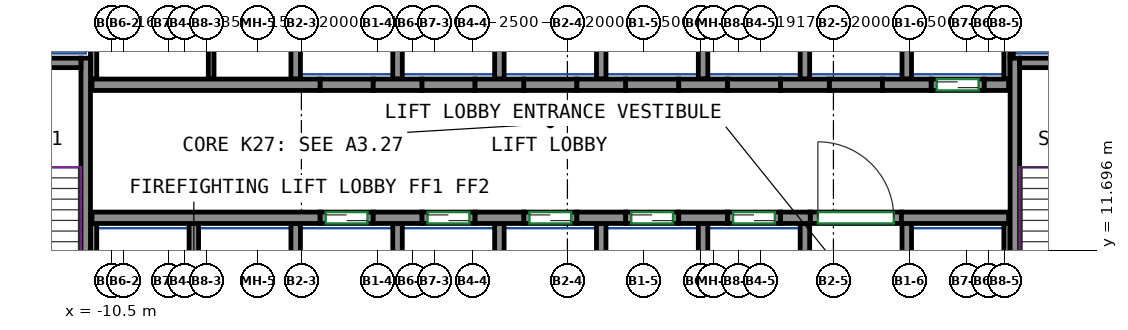
"""IFC4 building model, lengths in metres.
Left out: names, types, materials, properties, quantities, classifications, styles, units other than length and angle.
Written with IfcOpenShell. Run it as: python <this file> out.ifc"""

import sys

from ifc_helpers import new_model, si_unit, direction, frame, frame_2d, origin, place, context, subcontext, project, spatial, rectangle, extrude, source, transform, mapped, element, fill, save


model = new_model("IFC4")
c1 = context("Model", 3, precision=1e-05, world=origin(), true_north=direction((0.0, 1.0)))
c2 = subcontext(c1, "Body", "Model", "MODEL_VIEW")
j1 = project(units=[si_unit("LENGTHUNIT", "METRE"), si_unit("PLANEANGLEUNIT", "RADIAN")], contexts=[c1])
p1 = place(None, origin())
s1 = spatial("IfcSite", under=j1, at=p1, CompositionType="ELEMENT")
p2 = place(p1, origin())
s2 = spatial("IfcBuilding", under=s1, at=p2, CompositionType="ELEMENT")
p3 = place(p2, frame((0.0, 0.0, 112.6)))
s3 = spatial("IfcBuildingStorey", under=s2, at=p3, CompositionType="ELEMENT", Elevation=112.6)
m1 = source(origin(), c2, "Body", "SweptSolid", [
    extrude(rectangle(XDim=7.75, YDim=0.25, at=frame_2d((3.875, 0.0))), origin(), (0.0, 0.0, 1.0), 3.72),
])
p4 = place(p3, frame((-11.175, 9.0, 0.0), z_axis=(0.0, 0.0, 1.0), x_axis=(0.0, 1.0, 0.0)))
e1 = element("IfcWall", 1, at=p4, inside=s3, PredefinedType="SHEAR", context=c2, shape_type="MappedRepresentation", body=[
    mapped(m1, transform((0.0, 0.0, 0.0))),
])
m2 = source(origin(), c2, "Body", "SweptSolid", [
    extrude(rectangle(XDim=3.7, YDim=0.25, at=frame_2d((1.85, 0.0))), origin(), (0.0, 0.0, 1.0), 3.72),
])
p5 = place(p3, frame((-15.0, 16.625, 0.0), z_axis=(0.0, 0.0, 1.0), x_axis=(1.0, 0.0, 0.0)))
e2 = element("IfcWall", 2, at=p5, inside=s3, PredefinedType="SHEAR", context=c2, shape_type="MappedRepresentation", body=[
    mapped(m2, transform((0.0, 0.0, 0.0))),
])
p6 = place(p3, frame((13.275, 9.0, 0.0), z_axis=(0.0, 0.0, 1.0), x_axis=(0.0, 1.0, 0.0)))
e3 = element("IfcWall", 3, at=p6, inside=s3, PredefinedType="SHEAR", context=c2, shape_type="MappedRepresentation", body=[
    mapped(m1, transform((0.0, 0.0, 0.0))),
])
m3 = source(origin(), c2, "Body", "SweptSolid", [
    extrude(rectangle(XDim=3.7, YDim=0.25, at=frame_2d((1.85, 0.0))), origin(), (0.0, 0.0, 1.0), 3.72),
])
p7 = place(p3, frame((13.4, 16.625, 0.0), z_axis=(0.0, 0.0, 1.0), x_axis=(1.0, 0.0, 0.0)))
e4 = element("IfcWall", 4, at=p7, inside=s3, PredefinedType="SHEAR", context=c2, shape_type="MappedRepresentation", body=[
    mapped(m3, transform((0.0, 0.0, 0.0))),
])
m4 = source(origin(), c2, "Body", "SweptSolid", [
    extrude(rectangle(XDim=6.0, YDim=0.3, at=frame_2d((3.0, 0.0))), origin(), (0.0, 0.0, 1.0), 3.72),
])
p8 = place(p3, frame((-11.01, 12.55, 0.0), z_axis=(0.0, 0.0, 1.0), x_axis=(1.0, 0.0, 0.0)))
e5 = element("IfcWall", 5, at=p8, inside=s3, PredefinedType="SHEAR", context=c2, shape_type="MappedRepresentation", body=[
    mapped(m4, transform((0.0, 0.0, 0.0))),
])
m5 = source(origin(), c2, "Body", "SweptSolid", [
    extrude(rectangle(XDim=1.28, YDim=0.3, at=frame_2d((0.64, 0.0))), origin(), (0.0, 0.0, 1.0), 3.72),
])
for number, where, z_axis, x_axis in (
    (6, (-3.61, 12.55, 0.0), (0.0, 0.0, 1.0), (1.0, 0.0, 0.0)),
    (7, (-0.93, 12.55, 0.0), (0.0, 0.0, 1.0), (1.0, 0.0, 0.0)),
    (8, (1.75, 12.55, 0.0), (0.0, 0.0, 1.0), (1.0, 0.0, 0.0)),
    (9, (4.43, 12.55, 0.0), (0.0, 0.0, 1.0), (1.0, 0.0, 0.0)),
):
    element("IfcWall", number, at=place(p3, frame(where, z_axis=z_axis, x_axis=x_axis)), inside=s3, PredefinedType="SHEAR", context=c2, shape_type="MappedRepresentation", body=[
        mapped(m5, transform((0.0, 0.0, 0.0))),
    ])
m6 = source(origin(), c2, "Body", "SweptSolid", [
    extrude(rectangle(XDim=0.78, YDim=0.3, at=frame_2d((0.39, 0.0))), origin(), (0.0, 0.0, 1.0), 3.72),
])
p9 = place(p3, frame((7.11, 12.55, 0.0), z_axis=(0.0, 0.0, 1.0), x_axis=(1.0, 0.0, 0.0)))
e10 = element("IfcWall", 10, at=p9, inside=s3, PredefinedType="SHEAR", context=c2, shape_type="MappedRepresentation", body=[
    mapped(m6, transform((0.0, 0.0, 0.0))),
])
m7 = source(origin(), c2, "Body", "SweptSolid", [
    extrude(rectangle(XDim=2.82, YDim=0.3, at=frame_2d((1.41, 0.0))), origin(), (0.0, 0.0, 1.0), 3.72),
])
p10 = place(p3, frame((10.29, 12.55, 0.0), z_axis=(0.0, 0.0, 1.0), x_axis=(1.0, 0.0, 0.0)))
e11 = element("IfcWall", 11, at=p10, inside=s3, PredefinedType="SHEAR", context=c2, shape_type="MappedRepresentation", body=[
    mapped(m7, transform((0.0, 0.0, 0.0))),
])
p11 = place(p3, frame((-11.01, 16.05, 0.0), z_axis=(0.0, 0.0, 1.0), x_axis=(1.0, 0.0, 0.0)))
e12 = element("IfcWall", 12, at=p11, inside=s3, PredefinedType="SHEAR", context=c2, shape_type="MappedRepresentation", body=[
    mapped(m4, transform((0.0, 0.0, 0.0))),
])
for number, where, z_axis, x_axis in (
    (13, (-3.61, 16.05, 0.0), (0.0, 0.0, 1.0), (1.0, 0.0, 0.0)),
    (14, (-0.93, 16.05, 0.0), (0.0, 0.0, 1.0), (1.0, 0.0, 0.0)),
    (15, (1.75, 16.05, 0.0), (0.0, 0.0, 1.0), (1.0, 0.0, 0.0)),
    (16, (4.43, 16.05, 0.0), (0.0, 0.0, 1.0), (1.0, 0.0, 0.0)),
):
    element("IfcWall", number, at=place(p3, frame(where, z_axis=z_axis, x_axis=x_axis)), inside=s3, PredefinedType="SHEAR", context=c2, shape_type="MappedRepresentation", body=[
        mapped(m5, transform((0.0, 0.0, 0.0))),
    ])
m8 = source(origin(), c2, "Body", "SweptSolid", [
    extrude(rectangle(XDim=1.28, YDim=0.3, at=frame_2d((0.64, 0.0))), origin(), (0.0, 0.0, 1.0), 3.72),
])
p12 = place(p3, frame((7.11, 16.05, 0.0), z_axis=(0.0, 0.0, 1.0), x_axis=(1.0, 0.0, 0.0)))
e17 = element("IfcWall", 17, at=p12, inside=s3, PredefinedType="SHEAR", context=c2, shape_type="MappedRepresentation", body=[
    mapped(m8, transform((0.0, 0.0, 0.0))),
])
p13 = place(p3, frame((9.79, 16.05, 0.0), z_axis=(0.0, 0.0, 1.0), x_axis=(1.0, 0.0, 0.0)))
e18 = element("IfcWall", 18, at=p13, inside=s3, PredefinedType="SHEAR", context=c2, shape_type="MappedRepresentation", body=[
    mapped(m5, transform((0.0, 0.0, 0.0))),
])
m9 = source(origin(), c2, "Body", "SweptSolid", [
    extrude(rectangle(XDim=0.64, YDim=0.3, at=frame_2d((0.32, 0.0))), origin(), (0.0, 0.0, 1.0), 3.72),
])
p14 = place(p3, frame((12.47, 16.05, 0.0), z_axis=(0.0, 0.0, 1.0), x_axis=(1.0, 0.0, 0.0)))
e19 = element("IfcWall", 19, at=p14, inside=s3, PredefinedType="SHEAR", context=c2, shape_type="MappedRepresentation", body=[
    mapped(m9, transform((0.0, 0.0, 0.0))),
])
m10 = source(origin(), c2, "Body", "SweptSolid", [
    extrude(rectangle(XDim=1.4, YDim=0.3, at=frame_2d((0.7, 0.0))), origin(), (0.0, 0.0, 1.0), 3.72),
])
p15 = place(p3, frame((-5.01, 12.55, 0.0), z_axis=(0.0, 0.0, 1.0), x_axis=(1.0, 0.0, 0.0)))
e20 = element("IfcWall", 20, at=p15, inside=s3, PredefinedType="PARTITIONING", context=c2, shape_type="MappedRepresentation", body=[
    mapped(m10, transform((0.0, 0.0, 0.0))),
])
p16 = place(p15, frame((0.15, 0.0, 0.0)))
e21 = element("IfcOpeningElement", 21, at=p16, cuts=e20, PredefinedType="OPENING", context=c2, shape_type="SweptSolid", body=[
    extrude(rectangle(XDim=1.1, YDim=2.1, at=frame_2d((0.55, 1.05))), frame((0.0, 0.16, 0.0), z_axis=(0.0, -1.0, 0.0), x_axis=(1.0, 0.0, 0.0)), (0.0, 0.0, 1.0), 0.32),
])
m11 = source(origin(), c2, "Body", "SweptSolid", [
    extrude(rectangle(XDim=1.4, YDim=0.3, at=frame_2d((0.7, 0.0))), origin(), (0.0, 0.0, 1.0), 3.72),
])
p17 = place(p3, frame((-2.33, 12.55, 0.0), z_axis=(0.0, 0.0, 1.0), x_axis=(1.0, 0.0, 0.0)))
e22 = element("IfcWall", 22, at=p17, inside=s3, PredefinedType="PARTITIONING", context=c2, shape_type="MappedRepresentation", body=[
    mapped(m11, transform((0.0, 0.0, 0.0))),
])
p18 = place(p17, frame((0.15, 0.0, 0.0)))
e23 = element("IfcOpeningElement", 23, at=p18, cuts=e22, PredefinedType="OPENING", context=c2, shape_type="SweptSolid", body=[
    extrude(rectangle(XDim=1.1, YDim=2.1, at=frame_2d((0.55, 1.05))), frame((0.0, 0.16, 0.0), z_axis=(0.0, -1.0, 0.0), x_axis=(1.0, 0.0, 0.0)), (0.0, 0.0, 1.0), 0.32),
])
p19 = place(p3, frame((0.35, 12.55, 0.0), z_axis=(0.0, 0.0, 1.0), x_axis=(1.0, 0.0, 0.0)))
e24 = element("IfcWall", 24, at=p19, inside=s3, PredefinedType="PARTITIONING", context=c2, shape_type="MappedRepresentation", body=[
    mapped(m10, transform((0.0, 0.0, 0.0))),
])
p20 = place(p19, frame((0.15, 0.0, 0.0)))
e25 = element("IfcOpeningElement", 25, at=p20, cuts=e24, PredefinedType="OPENING", context=c2, shape_type="SweptSolid", body=[
    extrude(rectangle(XDim=1.1, YDim=2.1, at=frame_2d((0.55, 1.05))), frame((0.0, 0.16, 0.0), z_axis=(0.0, -1.0, 0.0), x_axis=(1.0, 0.0, 0.0)), (0.0, 0.0, 1.0), 0.32),
])
p21 = place(p3, frame((3.03, 12.55, 0.0), z_axis=(0.0, 0.0, 1.0), x_axis=(1.0, 0.0, 0.0)))
e26 = element("IfcWall", 26, at=p21, inside=s3, PredefinedType="PARTITIONING", context=c2, shape_type="MappedRepresentation", body=[
    mapped(m10, transform((0.0, 0.0, 0.0))),
])
p22 = place(p21, frame((0.15, 0.0, 0.0)))
e27 = element("IfcOpeningElement", 27, at=p22, cuts=e26, PredefinedType="OPENING", context=c2, shape_type="SweptSolid", body=[
    extrude(rectangle(XDim=1.1, YDim=2.1, at=frame_2d((0.55, 1.05))), frame((0.0, 0.16, 0.0), z_axis=(0.0, -1.0, 0.0), x_axis=(1.0, 0.0, 0.0)), (0.0, 0.0, 1.0), 0.32),
])
p23 = place(p3, frame((5.71, 12.55, 0.0), z_axis=(0.0, 0.0, 1.0), x_axis=(1.0, 0.0, 0.0)))
e28 = element("IfcWall", 28, at=p23, inside=s3, PredefinedType="PARTITIONING", context=c2, shape_type="MappedRepresentation", body=[
    mapped(m11, transform((0.0, 0.0, 0.0))),
])
p24 = place(p23, frame((0.15, 0.0, 0.0)))
e29 = element("IfcOpeningElement", 29, at=p24, cuts=e28, PredefinedType="OPENING", context=c2, shape_type="SweptSolid", body=[
    extrude(rectangle(XDim=1.1, YDim=2.1, at=frame_2d((0.55, 1.05))), frame((0.0, 0.16, 0.0), z_axis=(0.0, -1.0, 0.0), x_axis=(1.0, 0.0, 0.0)), (0.0, 0.0, 1.0), 0.32),
])
p25 = place(p3, frame((11.07, 16.05, 0.0), z_axis=(0.0, 0.0, 1.0), x_axis=(1.0, 0.0, 0.0)))
e30 = element("IfcWall", 30, at=p25, inside=s3, PredefinedType="PARTITIONING", context=c2, shape_type="MappedRepresentation", body=[
    mapped(m10, transform((0.0, 0.0, 0.0))),
])
p26 = place(p25, frame((0.15, 0.0, 0.0)))
e31 = element("IfcOpeningElement", 31, at=p26, cuts=e30, PredefinedType="OPENING", context=c2, shape_type="SweptSolid", body=[
    extrude(rectangle(XDim=1.1, YDim=2.1, at=frame_2d((0.55, 1.05))), frame((0.0, 0.16, 0.0), z_axis=(0.0, -1.0, 0.0), x_axis=(1.0, 0.0, 0.0)), (0.0, 0.0, 1.0), 0.32),
])
m12 = source(origin(), c2, "Body", "SweptSolid", [
    extrude(rectangle(XDim=2.4, YDim=0.3, at=frame_2d((1.2, 0.0))), origin(), (0.0, 0.0, 1.0), 3.72),
])
p27 = place(p3, frame((7.89, 12.55, 0.0), z_axis=(0.0, 0.0, 1.0), x_axis=(1.0, 0.0, 0.0)))
e32 = element("IfcWall", 32, at=p27, inside=s3, PredefinedType="PARTITIONING", context=c2, shape_type="MappedRepresentation", body=[
    mapped(m12, transform((0.0, 0.0, 0.0))),
])
p28 = place(p27, frame((0.2, 0.0, 0.0)))
e33 = element("IfcOpeningElement", 33, at=p28, cuts=e32, PredefinedType="OPENING", context=c2, shape_type="SweptSolid", body=[
    extrude(rectangle(XDim=2.0, YDim=2.1, at=frame_2d((1.0, 1.05))), frame((0.0, 0.16, 0.0), z_axis=(0.0, -1.0, 0.0), x_axis=(1.0, 0.0, 0.0)), (0.0, 0.0, 1.0), 0.32),
])
p29 = place(p3, frame((-5.01, 16.05, 0.0), z_axis=(0.0, 0.0, 1.0), x_axis=(1.0, 0.0, 0.0)))
e34 = element("IfcWall", 34, at=p29, inside=s3, PredefinedType="PARTITIONING", context=c2, shape_type="MappedRepresentation", body=[
    mapped(m10, transform((0.0, 0.0, 0.0))),
])
p30 = place(p3, frame((-2.33, 16.05, 0.0), z_axis=(0.0, 0.0, 1.0), x_axis=(1.0, 0.0, 0.0)))
e35 = element("IfcWall", 35, at=p30, inside=s3, PredefinedType="PARTITIONING", context=c2, shape_type="MappedRepresentation", body=[
    mapped(m11, transform((0.0, 0.0, 0.0))),
])
for number, where, z_axis, x_axis in (
    (36, (0.35, 16.05, 0.0), (0.0, 0.0, 1.0), (1.0, 0.0, 0.0)),
    (37, (3.03, 16.05, 0.0), (0.0, 0.0, 1.0), (1.0, 0.0, 0.0)),
):
    element("IfcWall", number, at=place(p3, frame(where, z_axis=z_axis, x_axis=x_axis)), inside=s3, PredefinedType="PARTITIONING", context=c2, shape_type="MappedRepresentation", body=[
        mapped(m10, transform((0.0, 0.0, 0.0))),
    ])
for number, where, z_axis, x_axis in (
    (38, (5.71, 16.05, 0.0), (0.0, 0.0, 1.0), (1.0, 0.0, 0.0)),
    (39, (8.39, 16.05, 0.0), (0.0, 0.0, 1.0), (1.0, 0.0, 0.0)),
):
    element("IfcWall", number, at=place(p3, frame(where, z_axis=z_axis, x_axis=x_axis)), inside=s3, PredefinedType="PARTITIONING", context=c2, shape_type="MappedRepresentation", body=[
        mapped(m11, transform((0.0, 0.0, 0.0))),
    ])
m13 = source(origin(), c2, "Body", "SweptSolid", [
    extrude(rectangle(XDim=3.275, YDim=0.165, at=frame_2d((1.638, 0.0))), origin(), (0.0, 0.0, 1.0), 3.72),
])
p31 = place(p3, frame((13.067, 16.2, 0.0), z_axis=(0.0, 0.0, 1.0), x_axis=(0.0, 1.0, 0.0)))
e40 = element("IfcWall", 40, at=p31, inside=s3, PredefinedType="PARTITIONING", context=c2, shape_type="MappedRepresentation", body=[
    mapped(m13, transform((0.0, 0.0, 0.0))),
])
m14 = source(origin(), c2, "Body", "SweptSolid", [
    extrude(rectangle(XDim=4.8, YDim=0.165, at=frame_2d((2.4, 0.0))), origin(), (0.0, 0.0, 1.0), 3.72),
])
p32 = place(p3, frame((-10.968, 16.2, 0.0), z_axis=(0.0, 0.0, 1.0), x_axis=(0.0, 1.0, 0.0)))
e41 = element("IfcWall", 41, at=p32, inside=s3, PredefinedType="PARTITIONING", context=c2, shape_type="MappedRepresentation", body=[
    mapped(m14, transform((0.0, 0.0, 0.0))),
])
m15 = source(origin(), c2, "Body", "SweptSolid", [
    extrude(rectangle(XDim=3.275, YDim=0.25, at=frame_2d((1.638, 0.0))), origin(), (0.0, 0.0, 1.0), 3.72),
])
p33 = place(p3, frame((10.43, 16.2, 0.0), z_axis=(0.0, 0.0, 1.0), x_axis=(0.0, 1.0, 0.0)))
e42 = element("IfcWall", 42, at=p33, inside=s3, PredefinedType="PARTITIONING", context=c2, shape_type="MappedRepresentation", body=[
    mapped(m15, transform((0.0, 0.0, 0.0))),
])
m16 = source(origin(), c2, "Body", "SweptSolid", [
    extrude(rectangle(XDim=2.725, YDim=0.085, at=frame_2d((1.363, 0.0))), origin(), (0.0, 0.0, 1.0), 3.72),
])
p34 = place(p3, frame((13.192, 16.75, 0.0), z_axis=(0.0, 0.0, 1.0), x_axis=(0.0, 1.0, 0.0)))
e43 = element("IfcWall", 43, at=p34, inside=s3, PredefinedType="PARTITIONING", context=c2, shape_type="MappedRepresentation", body=[
    mapped(m16, transform((0.0, 0.0, 0.0))),
])
for number, where, z_axis, x_axis in (
    (44, (2.39, 16.2, 0.0), (0.0, 0.0, 1.0), (0.0, 1.0, 0.0)),
    (45, (5.07, 16.2, 0.0), (0.0, 0.0, 1.0), (0.0, 1.0, 0.0)),
    (46, (7.75, 16.2, 0.0), (0.0, 0.0, 1.0), (0.0, 1.0, 0.0)),
    (47, (-0.29, 16.2, 0.0), (0.0, 0.0, 1.0), (0.0, 1.0, 0.0)),
    (48, (-2.97, 16.2, 0.0), (0.0, 0.0, 1.0), (0.0, 1.0, 0.0)),
    (49, (-5.65, 16.2, 0.0), (0.0, 0.0, 1.0), (0.0, 1.0, 0.0)),
):
    element("IfcWall", number, at=place(p3, frame(where, z_axis=z_axis, x_axis=x_axis)), inside=s3, PredefinedType="PARTITIONING", context=c2, shape_type="MappedRepresentation", body=[
        mapped(m15, transform((0.0, 0.0, 0.0))),
    ])
m17 = source(origin(), c2, "Body", "SweptSolid", [
    extrude(rectangle(XDim=3.4, YDim=0.25, at=frame_2d((1.7, 0.0))), origin(), (0.0, 0.0, 1.0), 3.72),
])
p35 = place(p3, frame((10.43, 9.0, 0.0), z_axis=(0.0, 0.0, 1.0), x_axis=(0.0, 1.0, 0.0)))
e50 = element("IfcWall", 50, at=p35, inside=s3, PredefinedType="PARTITIONING", context=c2, shape_type="MappedRepresentation", body=[
    mapped(m17, transform((0.0, 0.0, 0.0))),
])
m18 = source(origin(), c2, "Body", "SweptSolid", [
    extrude(rectangle(XDim=3.4, YDim=0.165, at=frame_2d((1.7, 0.0))), origin(), (0.0, 0.0, 1.0), 3.72),
])
p36 = place(p3, frame((13.067, 9.0, 0.0), z_axis=(0.0, 0.0, 1.0), x_axis=(0.0, 1.0, 0.0)))
e51 = element("IfcWall", 51, at=p36, inside=s3, PredefinedType="PARTITIONING", context=c2, shape_type="MappedRepresentation", body=[
    mapped(m18, transform((0.0, 0.0, 0.0))),
])
for number, where, z_axis, x_axis in (
    (52, (2.39, 9.0, 0.0), (0.0, 0.0, 1.0), (0.0, 1.0, 0.0)),
    (53, (5.07, 9.0, 0.0), (0.0, 0.0, 1.0), (0.0, 1.0, 0.0)),
    (54, (7.75, 9.0, 0.0), (0.0, 0.0, 1.0), (0.0, 1.0, 0.0)),
    (55, (-0.29, 9.0, 0.0), (0.0, 0.0, 1.0), (0.0, 1.0, 0.0)),
):
    element("IfcWall", number, at=place(p3, frame(where, z_axis=z_axis, x_axis=x_axis)), inside=s3, PredefinedType="PARTITIONING", context=c2, shape_type="MappedRepresentation", body=[
        mapped(m17, transform((0.0, 0.0, 0.0))),
    ])
p37 = place(p3, frame((-10.968, 9.0, 0.0), z_axis=(0.0, 0.0, 1.0), x_axis=(0.0, 1.0, 0.0)))
e56 = element("IfcWall", 56, at=p37, inside=s3, PredefinedType="PARTITIONING", context=c2, shape_type="MappedRepresentation", body=[
    mapped(m18, transform((0.0, 0.0, 0.0))),
])
for number, where, z_axis, x_axis in (
    (57, (-2.97, 9.0, 0.0), (0.0, 0.0, 1.0), (0.0, 1.0, 0.0)),
    (58, (-5.65, 9.0, 0.0), (0.0, 0.0, 1.0), (0.0, 1.0, 0.0)),
    (59, (-8.33, 9.0, 0.0), (0.0, 0.0, 1.0), (0.0, 1.0, 0.0)),
):
    element("IfcWall", number, at=place(p3, frame(where, z_axis=z_axis, x_axis=x_axis)), inside=s3, PredefinedType="PARTITIONING", context=c2, shape_type="MappedRepresentation", body=[
        mapped(m17, transform((0.0, 0.0, 0.0))),
    ])
m19 = source(origin(), c2, "Body", "SweptSolid", [
    extrude(rectangle(XDim=4.8, YDim=0.15, at=frame_2d((2.4, 0.0))), origin(), (0.0, 0.0, 1.0), 3.72),
])
p38 = place(p3, frame((-7.875, 16.2, 0.0), z_axis=(0.0, 0.0, 1.0), x_axis=(0.0, 1.0, 0.0)))
e60 = element("IfcWall", 60, at=p38, inside=s3, PredefinedType="PARTITIONING", context=c2, shape_type="MappedRepresentation", body=[
    mapped(m19, transform((0.0, 0.0, 0.0))),
])
p39 = place(p28, origin())
e61 = element("IfcDoor", 61, at=p39, inside=s3, OperationType="DOUBLE_DOOR_SINGLE_SWING", PredefinedType="DOOR", context=c2, shape_type="SweptSolid", body=[
    extrude(rectangle(XDim=2.0, YDim=2.1, at=frame_2d((1.0, 1.05))), frame((0.0, 0.025, 0.0), z_axis=(0.0, -1.0, 0.0), x_axis=(1.0, 0.0, 0.0)), (0.0, 0.0, 1.0), 0.05),
])
fill(e33, e61)
p40 = place(p16, origin())
e62 = element("IfcDoor", 62, at=p40, inside=s3, OperationType="DOUBLE_DOOR_SLIDING", PredefinedType="DOOR", context=c2, shape_type="SweptSolid", body=[
    extrude(rectangle(XDim=1.1, YDim=2.1, at=frame_2d((0.55, 1.05))), frame((0.0, 0.025, 0.0), z_axis=(0.0, -1.0, 0.0), x_axis=(1.0, 0.0, 0.0)), (0.0, 0.0, 1.0), 0.05),
])
fill(e21, e62)
p41 = place(p18, origin())
e63 = element("IfcDoor", 63, at=p41, inside=s3, OperationType="DOUBLE_DOOR_SLIDING", PredefinedType="DOOR", context=c2, shape_type="SweptSolid", body=[
    extrude(rectangle(XDim=1.1, YDim=2.1, at=frame_2d((0.55, 1.05))), frame((0.0, 0.025, 0.0), z_axis=(0.0, -1.0, 0.0), x_axis=(1.0, 0.0, 0.0)), (0.0, 0.0, 1.0), 0.05),
])
fill(e23, e63)
p42 = place(p20, origin())
e64 = element("IfcDoor", 64, at=p42, inside=s3, OperationType="DOUBLE_DOOR_SLIDING", PredefinedType="DOOR", context=c2, shape_type="SweptSolid", body=[
    extrude(rectangle(XDim=1.1, YDim=2.1, at=frame_2d((0.55, 1.05))), frame((0.0, 0.025, 0.0), z_axis=(0.0, -1.0, 0.0), x_axis=(1.0, 0.0, 0.0)), (0.0, 0.0, 1.0), 0.05),
])
fill(e25, e64)
p43 = place(p22, origin())
e65 = element("IfcDoor", 65, at=p43, inside=s3, OperationType="DOUBLE_DOOR_SLIDING", PredefinedType="DOOR", context=c2, shape_type="SweptSolid", body=[
    extrude(rectangle(XDim=1.1, YDim=2.1, at=frame_2d((0.55, 1.05))), frame((0.0, 0.025, 0.0), z_axis=(0.0, -1.0, 0.0), x_axis=(1.0, 0.0, 0.0)), (0.0, 0.0, 1.0), 0.05),
])
fill(e27, e65)
p44 = place(p24, origin())
e66 = element("IfcDoor", 66, at=p44, inside=s3, OperationType="DOUBLE_DOOR_SLIDING", PredefinedType="DOOR", context=c2, shape_type="SweptSolid", body=[
    extrude(rectangle(XDim=1.1, YDim=2.1, at=frame_2d((0.55, 1.05))), frame((0.0, 0.025, 0.0), z_axis=(0.0, -1.0, 0.0), x_axis=(1.0, 0.0, 0.0)), (0.0, 0.0, 1.0), 0.05),
])
fill(e29, e66)
p45 = place(p26, origin())
e67 = element("IfcDoor", 67, at=p45, inside=s3, OperationType="DOUBLE_DOOR_SLIDING", PredefinedType="DOOR", context=c2, shape_type="SweptSolid", body=[
    extrude(rectangle(XDim=1.1, YDim=2.1, at=frame_2d((0.55, 1.05))), frame((0.0, 0.025, 0.0), z_axis=(0.0, -1.0, 0.0), x_axis=(1.0, 0.0, 0.0)), (0.0, 0.0, 1.0), 0.05),
])
fill(e31, e67)
save(model, sys.argv[1])
